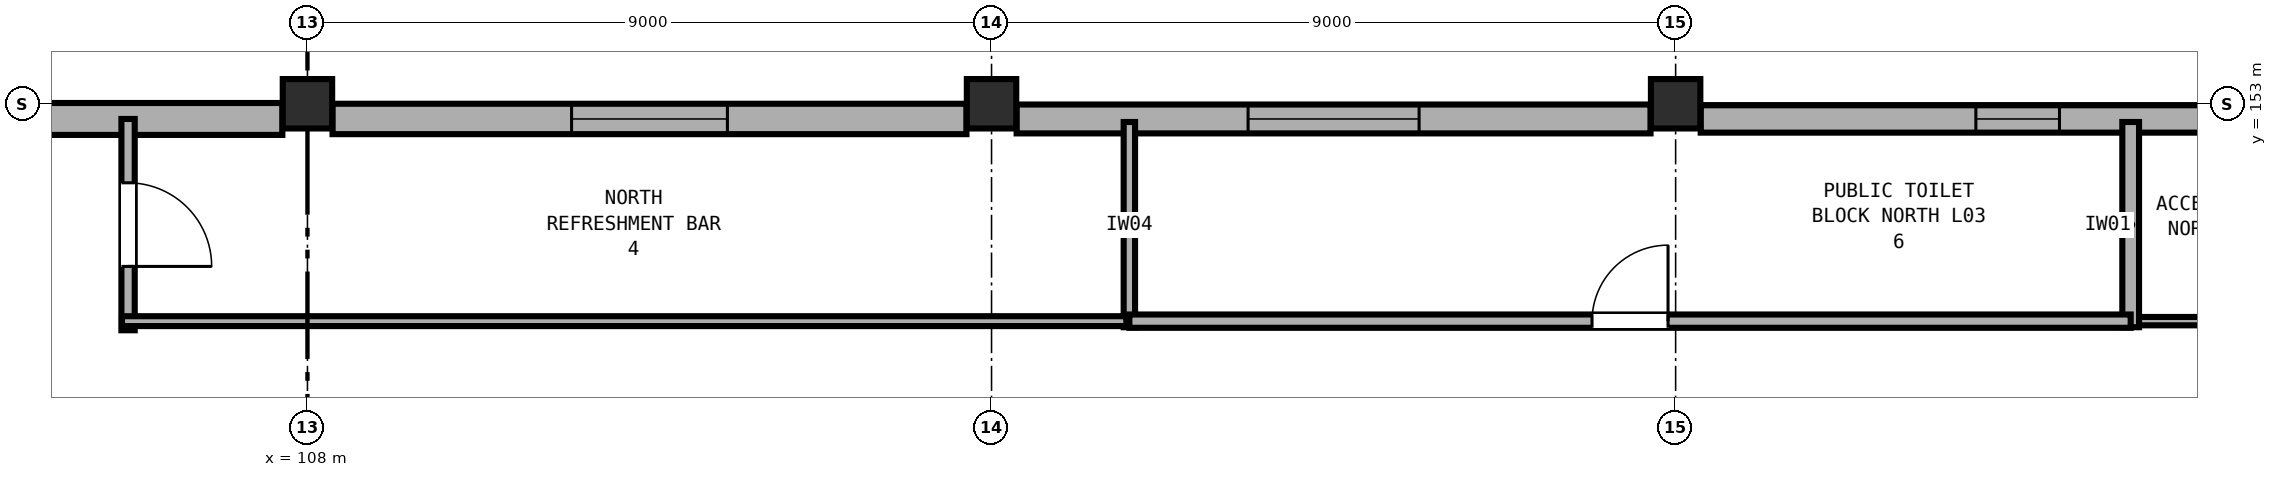
"""IFC4 building model, lengths in metres.
Left out: names, types, materials, properties, quantities, classifications, styles, units other than length and angle.
Written with IfcOpenShell. Run it as: python <this file> out.ifc"""

import sys

from ifc_helpers import new_model, si_unit, direction, frame, frame_2d, origin, origin_2d, place, context, subcontext, project, spatial, rectangle, extrude, element, fill, save


model = new_model("IFC4")
c1 = context("Model", 3, precision=1e-05, world=origin(), true_north=direction((0.0, 1.0)))
c2 = subcontext(c1, "Body", "Model", "MODEL_VIEW")
j1 = project(units=[si_unit("LENGTHUNIT", "METRE"), si_unit("PLANEANGLEUNIT", "RADIAN")], contexts=[c1])
p1 = place(None, origin())
s1 = spatial("IfcSite", under=j1, at=p1, CompositionType="ELEMENT")
p2 = place(p1, origin())
s2 = spatial("IfcBuilding", under=s1, at=p2, CompositionType="ELEMENT")
p3 = place(p2, frame((0.0, 0.0, 14.4)))
s3 = spatial("IfcBuildingStorey", under=s2, at=p3, CompositionType="ELEMENT", Elevation=14.4)
for number, where, z_axis, x_axis in (
    (1, (108.0, 153.0, 0.0), (0.0, 0.0, 1.0), (1.0, 0.0, 0.0)),
    (2, (117.0, 153.0, 0.0), (0.0, 0.0, 1.0), (1.0, 0.0, 0.0)),
    (3, (126.0, 153.0, 0.0), (0.0, 0.0, 1.0), (1.0, 0.0, 0.0)),
):
    element("IfcColumn", number, at=place(p3, frame(where, z_axis=z_axis, x_axis=x_axis)), inside=s3, PredefinedType="COLUMN", context=c2, shape_type="SweptSolid", body=[
        extrude(rectangle(XDim=0.65, YDim=0.65, at=origin_2d()), origin(), (0.0, 0.0, 1.0), 4.8),
    ])
p4 = place(p3, frame((99.33, 152.8, 0.0), z_axis=(0.0, 0.0, 1.0), x_axis=(1.0, 0.0, 0.0)))
e4 = element("IfcWall", 4, at=p4, inside=s3, PredefinedType="SOLIDWALL", context=c2, shape_type="SweptSolid", body=[
    extrude(rectangle(XDim=8.34, YDim=0.42, at=frame_2d((4.17, 0.0))), origin(), (0.0, 0.0, 1.0), 3.58),
])
p5 = place(p4, frame((3.245, 0.0, 0.9)))
e5 = element("IfcOpeningElement", 5, at=p5, cuts=e4, PredefinedType="OPENING", context=c2, shape_type="SweptSolid", body=[
    extrude(rectangle(XDim=1.85, YDim=1.95, at=frame_2d((0.925, 0.975))), frame((0.0, 0.22, 0.0), z_axis=(0.0, -1.0, 0.0), x_axis=(1.0, 0.0, 0.0)), (0.0, 0.0, 1.0), 0.44),
])
p6 = place(p3, frame((108.33, 152.8, 0.0), z_axis=(0.0, 0.0, 1.0), x_axis=(1.0, 0.0, 0.0)))
e6 = element("IfcWall", 6, at=p6, inside=s3, PredefinedType="SOLIDWALL", context=c2, shape_type="SweptSolid", body=[
    extrude(rectangle(XDim=8.34, YDim=0.4, at=frame_2d((4.17, 0.0))), origin(), (0.0, 0.0, 1.0), 3.58),
])
p7 = place(p6, frame((3.145, 0.0, 0.9)))
e7 = element("IfcOpeningElement", 7, at=p7, cuts=e6, PredefinedType="OPENING", context=c2, shape_type="SweptSolid", body=[
    extrude(rectangle(XDim=2.05, YDim=2.0, at=frame_2d((1.025, 1.0))), frame((0.0, 0.21, 0.0), z_axis=(0.0, -1.0, 0.0), x_axis=(1.0, 0.0, 0.0)), (0.0, 0.0, 1.0), 0.42),
])
p8 = place(p3, frame((117.33, 152.8, 0.0), z_axis=(0.0, 0.0, 1.0), x_axis=(1.0, 0.0, 0.0)))
e8 = element("IfcWall", 8, at=p8, inside=s3, PredefinedType="SOLIDWALL", context=c2, shape_type="SweptSolid", body=[
    extrude(rectangle(XDim=8.34, YDim=0.38, at=frame_2d((4.17, 0.0))), origin(), (0.0, 0.0, 1.0), 3.58),
])
p9 = place(p8, frame((3.045, 0.0, 0.9)))
e9 = element("IfcOpeningElement", 9, at=p9, cuts=e8, PredefinedType="OPENING", context=c2, shape_type="SweptSolid", body=[
    extrude(rectangle(XDim=2.25, YDim=2.05, at=frame_2d((1.125, 1.025))), frame((0.0, 0.2, 0.0), z_axis=(0.0, -1.0, 0.0), x_axis=(1.0, 0.0, 0.0)), (0.0, 0.0, 1.0), 0.4),
])
p10 = place(p3, frame((126.33, 152.8, 0.0), z_axis=(0.0, 0.0, 1.0), x_axis=(1.0, 0.0, 0.0)))
e10 = element("IfcWall", 10, at=p10, inside=s3, PredefinedType="SOLIDWALL", context=c2, shape_type="SweptSolid", body=[
    extrude(rectangle(XDim=8.34, YDim=0.36, at=frame_2d((4.17, 0.0))), origin(), (0.0, 0.0, 1.0), 3.58),
])
p11 = place(p10, frame((3.62, 0.0, 0.9)))
e11 = element("IfcOpeningElement", 11, at=p11, cuts=e10, PredefinedType="OPENING", context=c2, shape_type="SweptSolid", body=[
    extrude(rectangle(XDim=1.1, YDim=1.4, at=frame_2d((0.55, 0.7))), frame((0.0, 0.19, 0.0), z_axis=(0.0, -1.0, 0.0), x_axis=(1.0, 0.0, 0.0)), (0.0, 0.0, 1.0), 0.38),
])
p12 = place(p3, frame((105.64, 152.8, 0.0), z_axis=(0.0, 0.0, 1.0), x_axis=(0.0, -1.0, 0.0)))
e12 = element("IfcWall", 12, at=p12, inside=s3, PredefinedType="PARTITIONING", context=c2, shape_type="SweptSolid", body=[
    extrude(rectangle(XDim=2.78, YDim=0.175, at=frame_2d((1.39, 0.0))), origin(), (0.0, 0.0, 1.0), 3.56),
])
p13 = place(p12, frame((0.84, 0.0, 0.0)))
e13 = element("IfcOpeningElement", 13, at=p13, cuts=e12, PredefinedType="OPENING", context=c2, shape_type="SweptSolid", body=[
    extrude(rectangle(XDim=1.1, YDim=2.1, at=frame_2d((0.55, 1.05))), frame((0.0, 0.097, 0.0), z_axis=(0.0, -1.0, 0.0), x_axis=(1.0, 0.0, 0.0)), (0.0, 0.0, 1.0), 0.195),
])
p14 = place(p3, frame((118.813, 152.76, 0.0), z_axis=(0.0, 0.0, 1.0), x_axis=(0.0, -1.0, 0.0)))
e14 = element("IfcWall", 14, at=p14, inside=s3, PredefinedType="PARTITIONING", context=c2, shape_type="SweptSolid", body=[
    extrude(rectangle(XDim=2.7, YDim=0.15, at=frame_2d((1.35, 0.0))), origin(), (0.0, 0.0, 1.0), 3.56),
])
p15 = place(p3, frame((118.773, 150.14, 0.0), z_axis=(0.0, 0.0, 1.0), x_axis=(-1.0, 0.0, 0.0)))
e15 = element("IfcWall", 15, at=p15, inside=s3, PredefinedType="PARTITIONING", context=c2, shape_type="SweptSolid", body=[
    extrude(rectangle(XDim=13.213, YDim=0.13, at=frame_2d((6.606, 0.0))), origin(), (0.0, 0.0, 1.0), 3.56),
])
p16 = place(p3, frame((131.987, 150.14, 0.0), z_axis=(0.0, 0.0, 1.0), x_axis=(1.0, 0.0, 0.0)))
e16 = element("IfcWall", 16, at=p16, inside=s3, PredefinedType="PARTITIONING", context=c2, shape_type="SweptSolid", body=[
    extrude(rectangle(XDim=13.293, YDim=0.11, at=frame_2d((6.646, 0.0))), origin(), (0.0, 0.0, 1.0), 3.56),
])
p17 = place(p16, frame((6.122, 0.0, 0.0)))
e17 = element("IfcOpeningElement", 17, at=p17, cuts=e16, PredefinedType="OPENING", context=c2, shape_type="SweptSolid", body=[
    extrude(rectangle(XDim=1.05, YDim=2.1, at=frame_2d((0.525, 1.05))), frame((0.0, 0.065, 0.0), z_axis=(0.0, -1.0, 0.0), x_axis=(1.0, 0.0, 0.0)), (0.0, 0.0, 1.0), 0.13),
])
p18 = place(p3, frame((131.987, 150.06, 0.0), z_axis=(0.0, 0.0, 1.0), x_axis=(0.0, 1.0, 0.0)))
e18 = element("IfcWall", 18, at=p18, inside=s3, PredefinedType="PARTITIONING", context=c2, shape_type="SweptSolid", body=[
    extrude(rectangle(XDim=2.7, YDim=0.22, at=frame_2d((1.35, 0.0))), origin(), (0.0, 0.0, 1.0), 3.56),
])
p19 = place(p3, frame((118.813, 150.14, 0.0), z_axis=(0.0, 0.0, 1.0), x_axis=(1.0, 0.0, 0.0)))
e19 = element("IfcWall", 19, at=p19, inside=s3, PredefinedType="PARTITIONING", context=c2, shape_type="SweptSolid", body=[
    extrude(rectangle(XDim=13.174, YDim=0.175, at=frame_2d((6.587, 0.0))), origin(), (0.0, 0.0, 1.0), 3.56),
])
p20 = place(p19, frame((6.087, 0.0, 0.0)))
e20 = element("IfcOpeningElement", 20, at=p20, cuts=e19, PredefinedType="OPENING", context=c2, shape_type="SweptSolid", body=[
    extrude(rectangle(XDim=1.0, YDim=2.1, at=frame_2d((0.5, 1.05))), frame((0.0, 0.097, 0.0), z_axis=(0.0, -1.0, 0.0), x_axis=(1.0, 0.0, 0.0)), (0.0, 0.0, 1.0), 0.195),
])
p21 = place(p7, origin())
e21 = element("IfcWindow", 21, at=p21, inside=s3, PartitioningType="DOUBLE_PANEL_VERTICAL", PredefinedType="WINDOW", context=c2, shape_type="SweptSolid", body=[
    extrude(rectangle(XDim=2.05, YDim=2.0, at=frame_2d((1.025, 1.0))), frame((0.0, 0.03, 0.0), z_axis=(0.0, -1.0, 0.0), x_axis=(1.0, 0.0, 0.0)), (0.0, 0.0, 1.0), 0.06),
])
fill(e7, e21)
p22 = place(p9, origin())
e22 = element("IfcWindow", 22, at=p22, inside=s3, PartitioningType="DOUBLE_PANEL_VERTICAL", PredefinedType="WINDOW", context=c2, shape_type="SweptSolid", body=[
    extrude(rectangle(XDim=2.25, YDim=2.05, at=frame_2d((1.125, 1.025))), frame((0.0, 0.03, 0.0), z_axis=(0.0, -1.0, 0.0), x_axis=(1.0, 0.0, 0.0)), (0.0, 0.0, 1.0), 0.06),
])
fill(e9, e22)
p23 = place(p11, origin())
e23 = element("IfcWindow", 23, at=p23, inside=s3, PartitioningType="SINGLE_PANEL", PredefinedType="WINDOW", context=c2, shape_type="SweptSolid", body=[
    extrude(rectangle(XDim=1.1, YDim=1.4, at=frame_2d((0.55, 0.7))), frame((0.0, 0.03, 0.0), z_axis=(0.0, -1.0, 0.0), x_axis=(1.0, 0.0, 0.0)), (0.0, 0.0, 1.0), 0.06),
])
fill(e11, e23)
p24 = place(p13, origin())
e24 = element("IfcDoor", 24, at=p24, inside=s3, OperationType="SINGLE_SWING_RIGHT", PredefinedType="DOOR", context=c2, shape_type="SweptSolid", body=[
    extrude(rectangle(XDim=1.1, YDim=2.1, at=frame_2d((0.55, 1.05))), frame((0.0, 0.025, 0.0), z_axis=(0.0, -1.0, 0.0), x_axis=(1.0, 0.0, 0.0)), (0.0, 0.0, 1.0), 0.05),
])
fill(e13, e24)
p25 = place(p20, origin())
e25 = element("IfcDoor", 25, at=p25, inside=s3, OperationType="SINGLE_SWING_RIGHT", PredefinedType="DOOR", context=c2, shape_type="SweptSolid", body=[
    extrude(rectangle(XDim=1.0, YDim=2.1, at=frame_2d((0.5, 1.05))), frame((0.0, 0.025, 0.0), z_axis=(0.0, -1.0, 0.0), x_axis=(1.0, 0.0, 0.0)), (0.0, 0.0, 1.0), 0.05),
])
fill(e20, e25)
save(model, sys.argv[1])
